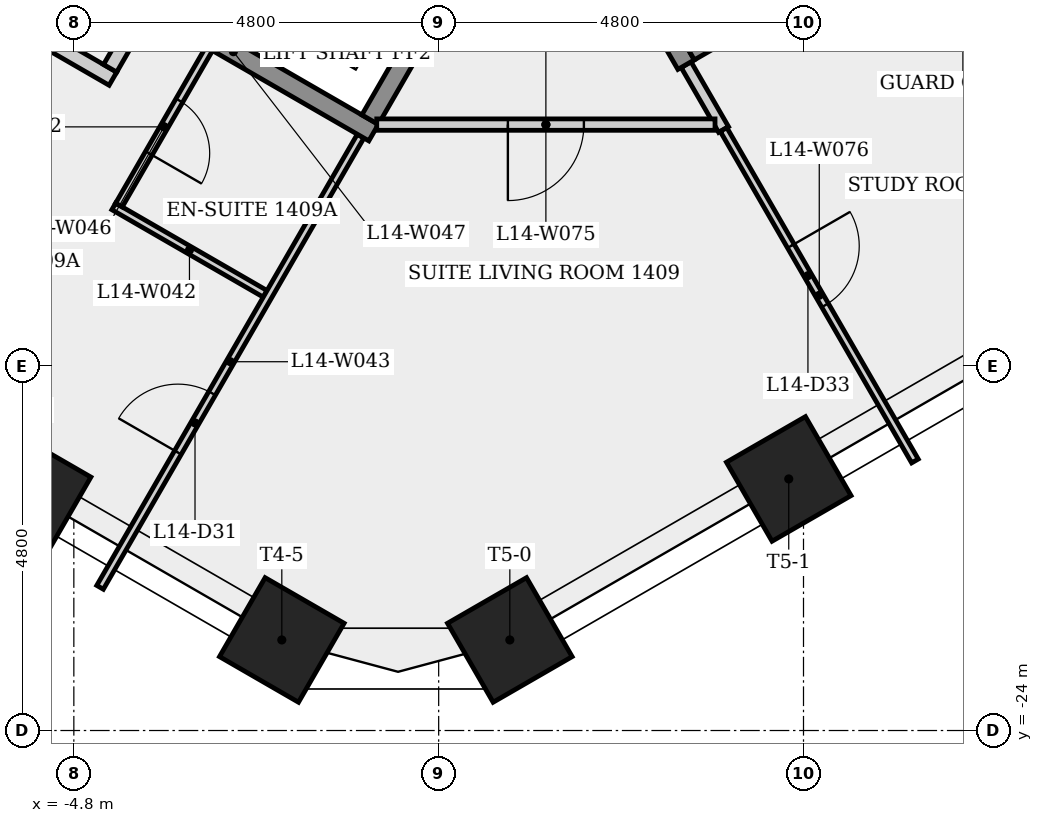
"""IFC4 building model, lengths in metres.
Left out: names, types, materials, properties, quantities, classifications, styles, units other than length and angle.
Written with IfcOpenShell. Run it as: python <this file> out.ifc"""

import sys

from ifc_helpers import new_model, si_unit, direction, frame, frame_2d, origin, origin_2d, place, context, subcontext, project, spatial, rectangle, extrude, element, fill, save


model = new_model("IFC4")
c1 = context("Model", 3, precision=1e-05, world=origin(), true_north=direction((0.0, 1.0)))
c2 = subcontext(c1, "Body", "Model", "MODEL_VIEW")
j1 = project(units=[si_unit("LENGTHUNIT", "METRE"), si_unit("PLANEANGLEUNIT", "RADIAN")], contexts=[c1])
p1 = place(None, origin())
s1 = spatial("IfcSite", under=j1, at=p1, CompositionType="ELEMENT")
p2 = place(p1, origin())
s2 = spatial("IfcBuilding", under=s1, at=p2, CompositionType="ELEMENT")
p3 = place(p2, frame((0.0, 0.0, 56.1)))
s3 = spatial("IfcBuildingStorey", under=s2, at=p3, CompositionType="ELEMENT", Elevation=56.1)
for number, where, z_axis, x_axis in (
    (1, (-5.395, -20.885, 0.0), (0.0, 0.0, 1.0), (-0.5, -0.866, 0.0)),
    (2, (-2.064, -22.808, 0.0), (0.0, 0.0, 1.0), (-0.5, -0.866, 0.0)),
    (3, (0.936, -22.808, 0.0), (0.0, 0.0, 1.0), (0.5, -0.866, 0.0)),
    (4, (4.606, -20.69, 0.0), (0.0, 0.0, 1.0), (0.5, -0.866, 0.0)),
):
    element("IfcColumn", number, at=place(p3, frame(where, z_axis=z_axis, x_axis=x_axis)), inside=s3, PredefinedType="COLUMN", context=c2, shape_type="SweptSolid", body=[
        extrude(rectangle(XDim=1.2, YDim=1.2, at=origin_2d()), origin(), (0.0, 0.0, 1.0), 3.4),
    ])
p4 = place(p3, frame((-8.356, -13.073, 0.0), z_axis=(0.0, 0.0, 1.0), x_axis=(0.866038532462, -0.499977259774, 0.0)))
e5 = element("IfcWall", 5, at=p4, inside=s3, PredefinedType="PARTITIONING", context=c2, shape_type="SweptSolid", body=[
    extrude(rectangle(XDim=4.7, YDim=0.2, at=frame_2d((2.35, 0.0))), origin(), (0.0, 0.0, 1.0), 3.05),
])
p5 = place(p3, frame((-4.275, -17.104, 0.0), z_axis=(0.0, 0.0, 1.0), x_axis=(0.866053019151, -0.499952165731, 0.0)))
e6 = element("IfcWall", 6, at=p5, inside=s3, PredefinedType="PARTITIONING", context=c2, shape_type="SweptSolid", body=[
    extrude(rectangle(XDim=2.3, YDim=0.1, at=frame_2d((1.15, 0.0))), origin(), (0.0, 0.0, 1.0), 3.05),
])
p6 = place(p3, frame((-4.455, -22.116, 0.0), z_axis=(0.0, 0.0, 1.0), x_axis=(0.499984476993, 0.866034365811, 0.0)))
e7 = element("IfcWall", 7, at=p6, inside=s3, PredefinedType="PARTITIONING", context=c2, shape_type="SweptSolid", body=[
    extrude(rectangle(XDim=6.856, YDim=0.1, at=frame_2d((3.428, 0.0))), origin(), (0.0, 0.0, 1.0), 3.05),
])
p7 = place(p6, frame((2.048, 0.0, 0.0)))
e8 = element("IfcOpeningElement", 8, at=p7, cuts=e7, PredefinedType="OPENING", context=c2, shape_type="SweptSolid", body=[
    extrude(rectangle(XDim=0.9, YDim=2.1, at=frame_2d((0.45, 1.05))), frame((0.0, 0.06, 0.0), z_axis=(0.0, -1.0, 0.0), x_axis=(1.0, 0.0, 0.0)), (0.0, 0.0, 1.0), 0.12),
])
p8 = place(p3, frame((-3.885, -14.529, 0.0), z_axis=(0.0, 0.0, 1.0), x_axis=(-0.499859285417, -0.866106630146, 0.0)))
e9 = element("IfcWall", 9, at=p8, inside=s3, PredefinedType="PARTITIONING", context=c2, shape_type="SweptSolid", body=[
    extrude(rectangle(XDim=0.875, YDim=0.2, at=frame_2d((0.438, 0.0))), origin(), (0.0, 0.0, 1.0), 3.05),
])
p9 = place(p3, frame((-3.019, -15.029, 0.0), z_axis=(0.0, 0.0, 1.0), x_axis=(-0.499986429846, -0.866033238375, 0.0)))
e10 = element("IfcWall", 10, at=p9, inside=s3, PredefinedType="PARTITIONING", context=c2, shape_type="SweptSolid", body=[
    extrude(rectangle(XDim=2.375, YDim=0.1, at=frame_2d((1.188, 0.0))), origin(), (0.0, 0.0, 1.0), 3.05),
])
p10 = place(p9, frame((0.788, 0.0, 0.0)))
e11 = element("IfcOpeningElement", 11, at=p10, cuts=e10, PredefinedType="OPENING", context=c2, shape_type="SweptSolid", body=[
    extrude(rectangle(XDim=0.8, YDim=2.1, at=frame_2d((0.4, 1.05))), frame((0.0, 0.06, 0.0), z_axis=(0.0, -1.0, 0.0), x_axis=(1.0, 0.0, 0.0)), (0.0, 0.0, 1.0), 0.12),
])
p11 = place(p3, frame((-3.931, -14.358, 0.0), z_axis=(0.0, 0.0, 1.0), x_axis=(0.8660424351, -0.499970499736, 0.0)))
e12 = element("IfcWall", 12, at=p11, inside=s3, PredefinedType="SHEAR", context=c2, shape_type="SweptSolid", body=[
    extrude(rectangle(XDim=3.55, YDim=0.25, at=frame_2d((1.775, 0.0))), origin(), (0.0, 0.0, 1.0), 3.05),
])
p12 = place(p3, frame((-0.902, -15.962, 0.0), z_axis=(0.0, 0.0, 1.0), x_axis=(0.499981517636, 0.866036074319, 0.0)))
e13 = element("IfcWall", 13, at=p12, inside=s3, PredefinedType="SHEAR", context=c2, shape_type="SweptSolid", body=[
    extrude(rectangle(XDim=2.61, YDim=0.25, at=frame_2d((1.305, 0.0))), origin(), (0.0, 0.0, 1.0), 3.05),
])
p13 = place(p3, frame((3.256, -15.239, 0.0), z_axis=(0.0, 0.0, 1.0), x_axis=(0.499815364442, -0.866131976934, 0.0)))
e14 = element("IfcWall", 14, at=p13, inside=s3, PredefinedType="PARTITIONING", context=c2, shape_type="SweptSolid", body=[
    extrude(rectangle(XDim=0.986, YDim=0.15, at=frame_2d((0.493, 0.0))), origin(), (0.0, 0.0, 1.0), 3.05),
])
p14 = place(p3, frame((3.256, -15.239, 0.0), z_axis=(0.0, 0.0, 1.0), x_axis=(-0.50002537861, 0.866010750942, 0.0)))
e15 = element("IfcWall", 15, at=p14, inside=s3, PredefinedType="SHEAR", context=c2, shape_type="SweptSolid", body=[
    extrude(rectangle(XDim=3.0, YDim=0.25, at=frame_2d((1.5, 0.0))), origin(), (0.0, 0.0, 1.0), 3.05),
])
p15 = place(p3, frame((3.636, -16.028, 0.0), z_axis=(0.0, 0.0, 1.0), x_axis=(-1.0, 0.0, 0.0)))
e16 = element("IfcWall", 16, at=p15, inside=s3, PredefinedType="PARTITIONING", context=c2, shape_type="SweptSolid", body=[
    extrude(rectangle(XDim=4.451, YDim=0.15, at=frame_2d((2.225, 0.0))), origin(), (0.0, 0.0, 1.0), 3.05),
])
p16 = place(p15, frame((1.725, 0.0, 0.0)))
e17 = element("IfcOpeningElement", 17, at=p16, cuts=e16, PredefinedType="OPENING", context=c2, shape_type="SweptSolid", body=[
    extrude(rectangle(XDim=1.0, YDim=2.1, at=frame_2d((0.5, 1.05))), frame((0.0, 0.085, 0.0), z_axis=(0.0, -1.0, 0.0), x_axis=(1.0, 0.0, 0.0)), (0.0, 0.0, 1.0), 0.17),
])
p17 = place(p3, frame((3.748, -16.093, 0.0), z_axis=(0.0, 0.0, 1.0), x_axis=(0.500028802338, -0.866008774109, 0.0)))
e18 = element("IfcWall", 18, at=p17, inside=s3, PredefinedType="PARTITIONING", context=c2, shape_type="SweptSolid", body=[
    extrude(rectangle(XDim=5.036, YDim=0.1, at=frame_2d((2.518, 0.0))), origin(), (0.0, 0.0, 1.0), 3.05),
])
p18 = place(p17, frame((1.77, 0.0, 0.0)))
e19 = element("IfcOpeningElement", 19, at=p18, cuts=e18, PredefinedType="OPENING", context=c2, shape_type="SweptSolid", body=[
    extrude(rectangle(XDim=0.9, YDim=2.1, at=frame_2d((0.45, 1.05))), frame((0.0, 0.06, 0.0), z_axis=(0.0, -1.0, 0.0), x_axis=(1.0, 0.0, 0.0)), (0.0, 0.0, 1.0), 0.12),
])
p19 = place(p3, frame((3.301, -15.068, 0.0), z_axis=(0.0, 0.0, 1.0), x_axis=(0.866035036182, 0.499983315828, 0.0)))
e20 = element("IfcWall", 20, at=p19, inside=s3, PredefinedType="SHEAR", context=c2, shape_type="SweptSolid", body=[
    extrude(rectangle(XDim=6.4, YDim=0.25, at=frame_2d((3.2, 0.0))), origin(), (0.0, 0.0, 1.0), 3.05),
])
p20 = place(p16, origin())
e21 = element("IfcDoor", 21, at=p20, inside=s3, OperationType="SINGLE_SWING_RIGHT", PredefinedType="DOOR", context=c2, shape_type="SweptSolid", body=[
    extrude(rectangle(XDim=1.0, YDim=2.1, at=frame_2d((0.5, 1.05))), frame((0.0, 0.025, 0.0), z_axis=(0.0, -1.0, 0.0), x_axis=(1.0, 0.0, 0.0)), (0.0, 0.0, 1.0), 0.05),
])
fill(e17, e21)
p21 = place(p7, origin())
e22 = element("IfcDoor", 22, at=p21, inside=s3, OperationType="SINGLE_SWING_LEFT", PredefinedType="DOOR", context=c2, shape_type="SweptSolid", body=[
    extrude(rectangle(XDim=0.9, YDim=2.1, at=frame_2d((0.45, 1.05))), frame((0.0, 0.025, 0.0), z_axis=(0.0, -1.0, 0.0), x_axis=(1.0, 0.0, 0.0)), (0.0, 0.0, 1.0), 0.05),
])
fill(e8, e22)
p22 = place(p10, origin())
e23 = element("IfcDoor", 23, at=p22, inside=s3, OperationType="SINGLE_SWING_RIGHT", PredefinedType="DOOR", context=c2, shape_type="SweptSolid", body=[
    extrude(rectangle(XDim=0.8, YDim=2.1, at=frame_2d((0.4, 1.05))), frame((0.0, 0.025, 0.0), z_axis=(0.0, -1.0, 0.0), x_axis=(1.0, 0.0, 0.0)), (0.0, 0.0, 1.0), 0.05),
])
fill(e11, e23)
p23 = place(p18, origin())
e24 = element("IfcDoor", 24, at=p23, inside=s3, OperationType="SINGLE_SWING_LEFT", PredefinedType="DOOR", context=c2, shape_type="SweptSolid", body=[
    extrude(rectangle(XDim=0.9, YDim=2.1, at=frame_2d((0.45, 1.05))), frame((0.0, 0.025, 0.0), z_axis=(0.0, -1.0, 0.0), x_axis=(1.0, 0.0, 0.0)), (0.0, 0.0, 1.0), 0.05),
])
fill(e19, e24)
save(model, sys.argv[1])
